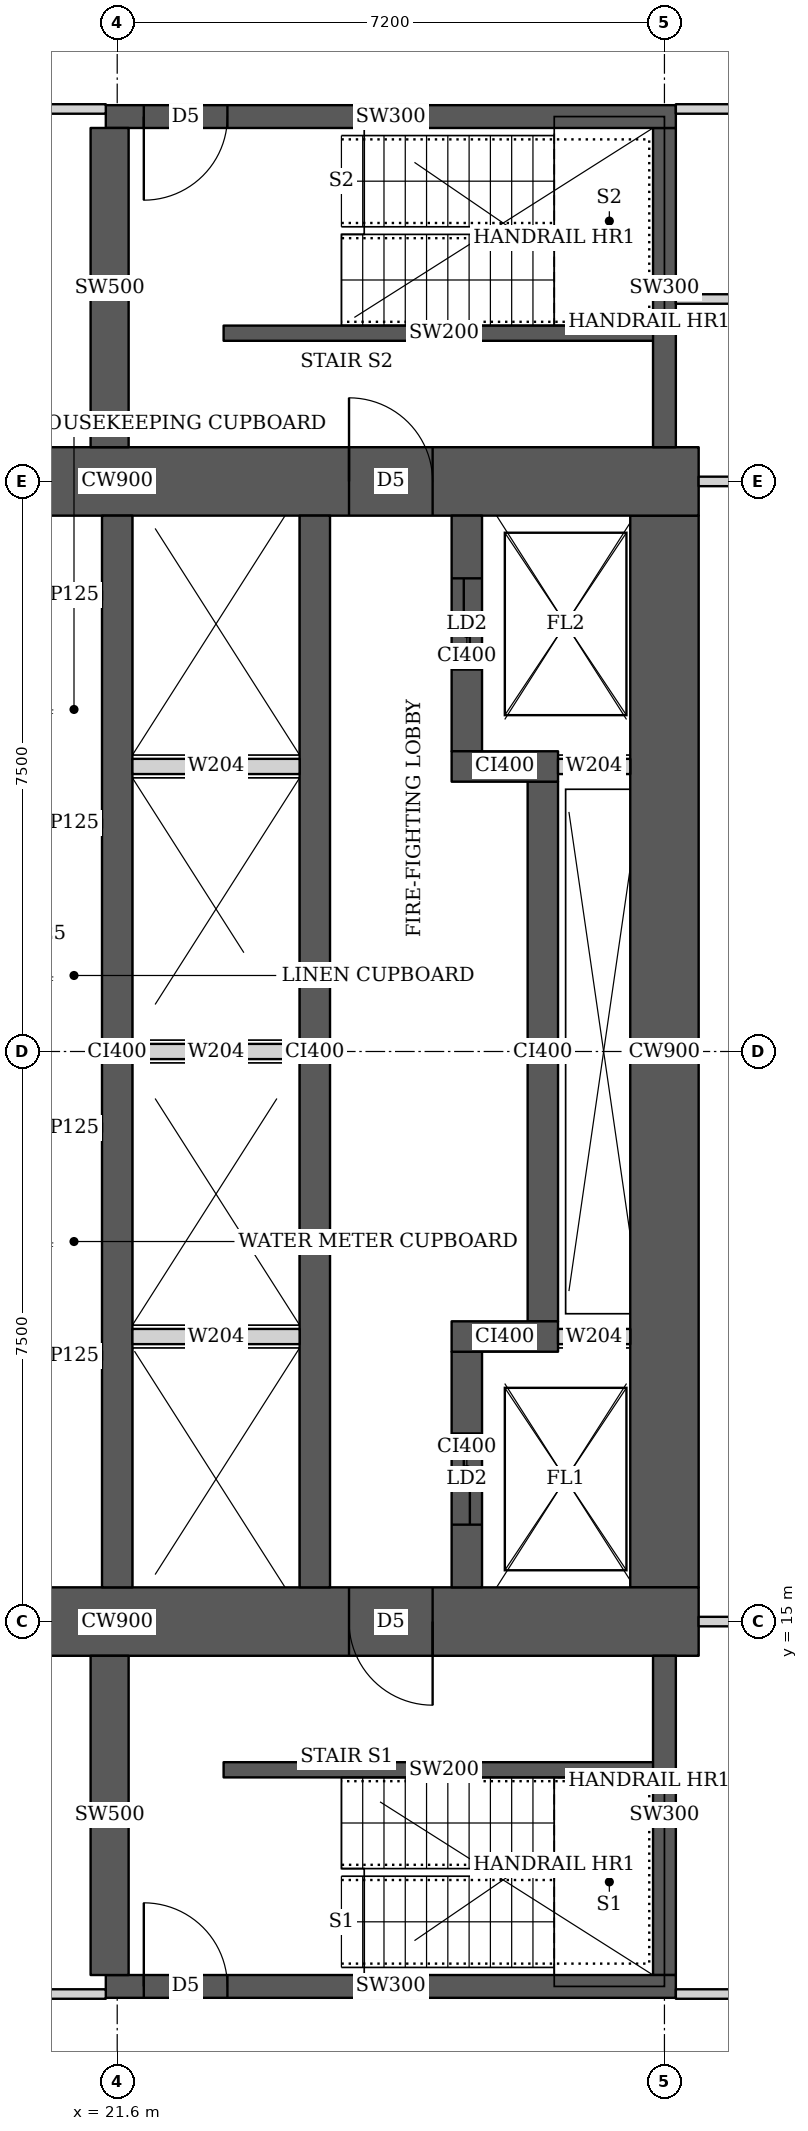
"""IFC4 building model, lengths in metres.
Left out: names, types, materials, properties, quantities, classifications, styles, units other than length and angle.
Written with IfcOpenShell. Run it as: python <this file> out.ifc"""

import sys

from ifc_helpers import new_model, si_unit, direction, frame, frame_2d, origin, place, context, subcontext, project, spatial, rectangle, extrude, element, fill, save


model = new_model("IFC4")
c1 = context("Model", 3, precision=1e-05, world=origin(), true_north=direction((0.0, 1.0)))
c2 = subcontext(c1, "Body", "Model", "MODEL_VIEW")
j1 = project(units=[si_unit("LENGTHUNIT", "METRE"), si_unit("PLANEANGLEUNIT", "RADIAN")], contexts=[c1])
p1 = place(None, origin())
s1 = spatial("IfcSite", under=j1, at=p1, CompositionType="ELEMENT")
p2 = place(p1, origin())
s2 = spatial("IfcBuilding", under=s1, at=p2, CompositionType="ELEMENT")
p3 = place(p2, frame((0.0, 0.0, 53.75)))
s3 = spatial("IfcBuildingStorey", under=s2, at=p3, CompositionType="ELEMENT", Elevation=53.75)
p4 = place(p3, frame((13.95, 15.0, 0.0), z_axis=(0.0, 0.0, 1.0), x_axis=(1.0, 0.0, 0.0)))
e1 = element("IfcWall", 1, at=p4, inside=s3, PredefinedType="SHEAR", context=c2, shape_type="SweptSolid", body=[
    extrude(rectangle(XDim=15.3, YDim=0.9, at=frame_2d((7.65, 0.0))), origin(), (0.0, 0.0, 1.0), 3.75),
])
p5 = place(p4, frame((4.45, 0.0, 0.0)))
e2 = element("IfcOpeningElement", 2, at=p5, cuts=e1, PredefinedType="OPENING", context=c2, shape_type="SweptSolid", body=[
    extrude(rectangle(XDim=1.8, YDim=2.1, at=frame_2d((0.9, 1.05))), frame((0.0, 0.46, 0.0), z_axis=(0.0, -1.0, 0.0), x_axis=(1.0, 0.0, 0.0)), (0.0, 0.0, 1.0), 0.92),
])
p6 = place(p4, frame((10.7, 0.0, 0.0)))
e3 = element("IfcOpeningElement", 3, at=p6, cuts=e1, PredefinedType="OPENING", context=c2, shape_type="SweptSolid", body=[
    extrude(rectangle(XDim=1.1, YDim=2.1, at=frame_2d((0.55, 1.05))), frame((0.0, 0.46, 0.0), z_axis=(0.0, -1.0, 0.0), x_axis=(1.0, 0.0, 0.0)), (0.0, 0.0, 1.0), 0.92),
])
p7 = place(p3, frame((13.95, 30.0, 0.0), z_axis=(0.0, 0.0, 1.0), x_axis=(1.0, 0.0, 0.0)))
e4 = element("IfcWall", 4, at=p7, inside=s3, PredefinedType="SHEAR", context=c2, shape_type="SweptSolid", body=[
    extrude(rectangle(XDim=15.3, YDim=0.9, at=frame_2d((7.65, 0.0))), origin(), (0.0, 0.0, 1.0), 3.75),
])
p8 = place(p7, frame((4.45, 0.0, 0.0)))
e5 = element("IfcOpeningElement", 5, at=p8, cuts=e4, PredefinedType="OPENING", context=c2, shape_type="SweptSolid", body=[
    extrude(rectangle(XDim=1.8, YDim=2.1, at=frame_2d((0.9, 1.05))), frame((0.0, 0.46, 0.0), z_axis=(0.0, -1.0, 0.0), x_axis=(1.0, 0.0, 0.0)), (0.0, 0.0, 1.0), 0.92),
])
p9 = place(p7, frame((10.7, 0.0, 0.0)))
e6 = element("IfcOpeningElement", 6, at=p9, cuts=e4, PredefinedType="OPENING", context=c2, shape_type="SweptSolid", body=[
    extrude(rectangle(XDim=1.1, YDim=2.1, at=frame_2d((0.55, 1.05))), frame((0.0, 0.46, 0.0), z_axis=(0.0, -1.0, 0.0), x_axis=(1.0, 0.0, 0.0)), (0.0, 0.0, 1.0), 0.92),
])
p10 = place(p3, frame((28.8, 15.45, 0.0), z_axis=(0.0, 0.0, 1.0), x_axis=(0.0, 1.0, 0.0)))
e7 = element("IfcWall", 7, at=p10, inside=s3, PredefinedType="SHEAR", context=c2, shape_type="SweptSolid", body=[
    extrude(rectangle(XDim=14.1, YDim=0.9, at=frame_2d((7.05, 0.0))), origin(), (0.0, 0.0, 1.0), 3.75),
])
for number, where, z_axis, x_axis in (
    (8, (21.6, 15.45, 0.0), (0.0, 0.0, 1.0), (0.0, 1.0, 0.0)),
    (9, (24.2, 15.45, 0.0), (0.0, 0.0, 1.0), (0.0, 1.0, 0.0)),
):
    element("IfcWall", number, at=place(p3, frame(where, z_axis=z_axis, x_axis=x_axis)), inside=s3, PredefinedType="SHEAR", context=c2, shape_type="SweptSolid", body=[
        extrude(rectangle(XDim=14.1, YDim=0.4, at=frame_2d((7.05, 0.0))), origin(), (0.0, 0.0, 1.0), 3.75),
    ])
p11 = place(p3, frame((26.2, 15.45, 0.0), z_axis=(0.0, 0.0, 1.0), x_axis=(0.0, 1.0, 0.0)))
e10 = element("IfcWall", 10, at=p11, inside=s3, PredefinedType="SHEAR", context=c2, shape_type="SweptSolid", body=[
    extrude(rectangle(XDim=3.1, YDim=0.4, at=frame_2d((1.55, 0.0))), origin(), (0.0, 0.0, 1.0), 3.75),
])
p12 = place(p11, frame((0.825, 0.0, 0.0)))
e11 = element("IfcOpeningElement", 11, at=p12, cuts=e10, PredefinedType="OPENING", context=c2, shape_type="SweptSolid", body=[
    extrude(rectangle(XDim=1.2, YDim=2.1, at=frame_2d((0.6, 1.05))), frame((0.0, 0.21, 0.0), z_axis=(0.0, -1.0, 0.0), x_axis=(1.0, 0.0, 0.0)), (0.0, 0.0, 1.0), 0.42),
])
p13 = place(p3, frame((26.0, 18.75, 0.0), z_axis=(0.0, 0.0, 1.0), x_axis=(1.0, 0.0, 0.0)))
e12 = element("IfcWall", 12, at=p13, inside=s3, PredefinedType="SHEAR", context=c2, shape_type="SweptSolid", body=[
    extrude(rectangle(XDim=1.4, YDim=0.4, at=frame_2d((0.7, 0.0))), origin(), (0.0, 0.0, 1.0), 3.75),
])
p14 = place(p3, frame((27.2, 18.95, 0.0), z_axis=(0.0, 0.0, 1.0), x_axis=(0.0, 1.0, 0.0)))
e13 = element("IfcWall", 13, at=p14, inside=s3, PredefinedType="SHEAR", context=c2, shape_type="SweptSolid", body=[
    extrude(rectangle(XDim=7.1, YDim=0.4, at=frame_2d((3.55, 0.0))), origin(), (0.0, 0.0, 1.0), 3.75),
])
p15 = place(p3, frame((26.0, 26.25, 0.0), z_axis=(0.0, 0.0, 1.0), x_axis=(1.0, 0.0, 0.0)))
e14 = element("IfcWall", 14, at=p15, inside=s3, PredefinedType="SHEAR", context=c2, shape_type="SweptSolid", body=[
    extrude(rectangle(XDim=1.4, YDim=0.4, at=frame_2d((0.7, 0.0))), origin(), (0.0, 0.0, 1.0), 3.75),
])
p16 = place(p3, frame((26.2, 26.45, 0.0), z_axis=(0.0, 0.0, 1.0), x_axis=(0.0, 1.0, 0.0)))
e15 = element("IfcWall", 15, at=p16, inside=s3, PredefinedType="SHEAR", context=c2, shape_type="SweptSolid", body=[
    extrude(rectangle(XDim=3.1, YDim=0.4, at=frame_2d((1.55, 0.0))), origin(), (0.0, 0.0, 1.0), 3.75),
])
p17 = place(p16, frame((1.075, 0.0, 0.0)))
e16 = element("IfcOpeningElement", 16, at=p17, cuts=e15, PredefinedType="OPENING", context=c2, shape_type="SweptSolid", body=[
    extrude(rectangle(XDim=1.2, YDim=2.1, at=frame_2d((0.6, 1.05))), frame((0.0, 0.21, 0.0), z_axis=(0.0, -1.0, 0.0), x_axis=(1.0, 0.0, 0.0)), (0.0, 0.0, 1.0), 0.42),
])
p18 = place(p3, frame((21.45, 10.2, 0.0), z_axis=(0.0, 0.0, 1.0), x_axis=(1.0, 0.0, 0.0)))
e17 = element("IfcWall", 17, at=p18, inside=s3, PredefinedType="SHEAR", context=c2, shape_type="SweptSolid", body=[
    extrude(rectangle(XDim=7.5, YDim=0.3, at=frame_2d((3.75, 0.0))), origin(), (0.0, 0.0, 1.0), 3.75),
])
p19 = place(p18, frame((0.5, 0.0, 0.0)))
e18 = element("IfcOpeningElement", 18, at=p19, cuts=e17, PredefinedType="OPENING", context=c2, shape_type="SweptSolid", body=[
    extrude(rectangle(XDim=1.1, YDim=2.1, at=frame_2d((0.55, 1.05))), frame((0.0, 0.16, 0.0), z_axis=(0.0, -1.0, 0.0), x_axis=(1.0, 0.0, 0.0)), (0.0, 0.0, 1.0), 0.32),
])
p20 = place(p3, frame((21.5, 10.35, 0.0), z_axis=(0.0, 0.0, 1.0), x_axis=(0.0, 1.0, 0.0)))
e19 = element("IfcWall", 19, at=p20, inside=s3, PredefinedType="SHEAR", context=c2, shape_type="SweptSolid", body=[
    extrude(rectangle(XDim=4.2, YDim=0.5, at=frame_2d((2.1, 0.0))), origin(), (0.0, 0.0, 1.0), 3.75),
])
p21 = place(p3, frame((28.8, 10.35, 0.0), z_axis=(0.0, 0.0, 1.0), x_axis=(0.0, 1.0, 0.0)))
e20 = element("IfcWall", 20, at=p21, inside=s3, PredefinedType="SHEAR", context=c2, shape_type="SweptSolid", body=[
    extrude(rectangle(XDim=4.2, YDim=0.3, at=frame_2d((2.1, 0.0))), origin(), (0.0, 0.0, 1.0), 3.75),
])
p22 = place(p3, frame((21.45, 34.8, 0.0), z_axis=(0.0, 0.0, 1.0), x_axis=(1.0, 0.0, 0.0)))
e21 = element("IfcWall", 21, at=p22, inside=s3, PredefinedType="SHEAR", context=c2, shape_type="SweptSolid", body=[
    extrude(rectangle(XDim=7.5, YDim=0.3, at=frame_2d((3.75, 0.0))), origin(), (0.0, 0.0, 1.0), 3.75),
])
p23 = place(p22, frame((0.5, 0.0, 0.0)))
e22 = element("IfcOpeningElement", 22, at=p23, cuts=e21, PredefinedType="OPENING", context=c2, shape_type="SweptSolid", body=[
    extrude(rectangle(XDim=1.1, YDim=2.1, at=frame_2d((0.55, 1.05))), frame((0.0, 0.16, 0.0), z_axis=(0.0, -1.0, 0.0), x_axis=(1.0, 0.0, 0.0)), (0.0, 0.0, 1.0), 0.32),
])
p24 = place(p3, frame((21.5, 30.45, 0.0), z_axis=(0.0, 0.0, 1.0), x_axis=(0.0, 1.0, 0.0)))
e23 = element("IfcWall", 23, at=p24, inside=s3, PredefinedType="SHEAR", context=c2, shape_type="SweptSolid", body=[
    extrude(rectangle(XDim=4.2, YDim=0.5, at=frame_2d((2.1, 0.0))), origin(), (0.0, 0.0, 1.0), 3.75),
])
p25 = place(p3, frame((28.8, 30.45, 0.0), z_axis=(0.0, 0.0, 1.0), x_axis=(0.0, 1.0, 0.0)))
e24 = element("IfcWall", 24, at=p25, inside=s3, PredefinedType="SHEAR", context=c2, shape_type="SweptSolid", body=[
    extrude(rectangle(XDim=4.2, YDim=0.3, at=frame_2d((2.1, 0.0))), origin(), (0.0, 0.0, 1.0), 3.75),
])
p26 = place(p3, frame((10.163, 10.1, 0.0), z_axis=(0.0, 0.0, 1.0), x_axis=(1.0, 0.0, 0.0)))
e25 = element("IfcWall", 25, at=p26, inside=s3, PredefinedType="PARTITIONING", context=c2, shape_type="SweptSolid", body=[
    extrude(rectangle(XDim=11.287, YDim=0.125, at=frame_2d((5.644, 0.0))), origin(), (0.0, 0.0, 1.0), 3.5),
])
p27 = place(p26, frame((7.832, 0.0, 0.0)))
e26 = element("IfcOpeningElement", 26, at=p27, cuts=e25, PredefinedType="OPENING", context=c2, shape_type="SweptSolid", body=[
    extrude(rectangle(XDim=1.8, YDim=2.1, at=frame_2d((0.9, 1.05))), frame((0.0, 0.073, 0.0), z_axis=(0.0, -1.0, 0.0), x_axis=(1.0, 0.0, 0.0)), (0.0, 0.0, 1.0), 0.145),
])
p28 = place(p3, frame((10.163, 34.9, 0.0), z_axis=(0.0, 0.0, 1.0), x_axis=(1.0, 0.0, 0.0)))
e27 = element("IfcWall", 27, at=p28, inside=s3, PredefinedType="PARTITIONING", context=c2, shape_type="SweptSolid", body=[
    extrude(rectangle(XDim=11.287, YDim=0.125, at=frame_2d((5.644, 0.0))), origin(), (0.0, 0.0, 1.0), 3.5),
])
p29 = place(p28, frame((7.737, 0.0, 0.0)))
e28 = element("IfcOpeningElement", 28, at=p29, cuts=e27, PredefinedType="OPENING", context=c2, shape_type="SweptSolid", body=[
    extrude(rectangle(XDim=1.8, YDim=2.1, at=frame_2d((0.9, 1.05))), frame((0.0, 0.073, 0.0), z_axis=(0.0, -1.0, 0.0), x_axis=(1.0, 0.0, 0.0)), (0.0, 0.0, 1.0), 0.145),
])
p30 = place(p3, frame((28.95, 10.1, 0.0), z_axis=(0.0, 0.0, 1.0), x_axis=(1.0, 0.0, 0.0)))
e29 = element("IfcWall", 29, at=p30, inside=s3, PredefinedType="PARTITIONING", context=c2, shape_type="SweptSolid", body=[
    extrude(rectangle(XDim=9.188, YDim=0.125, at=frame_2d((4.594, 0.0))), origin(), (0.0, 0.0, 1.0), 3.5),
])
p31 = place(p3, frame((28.95, 34.9, 0.0), z_axis=(0.0, 0.0, 1.0), x_axis=(1.0, 0.0, 0.0)))
e30 = element("IfcWall", 30, at=p31, inside=s3, PredefinedType="PARTITIONING", context=c2, shape_type="SweptSolid", body=[
    extrude(rectangle(XDim=4.588, YDim=0.125, at=frame_2d((2.294, 0.0))), origin(), (0.0, 0.0, 1.0), 3.5),
])
p32 = place(p3, frame((29.25, 15.0, 0.0), z_axis=(0.0, 0.0, 1.0), x_axis=(1.0, 0.0, 0.0)))
e31 = element("IfcWall", 31, at=p32, inside=s3, PredefinedType="PARTITIONING", context=c2, shape_type="SweptSolid", body=[
    extrude(rectangle(XDim=5.849, YDim=0.125, at=frame_2d((2.925, 0.0))), origin(), (0.0, 0.0, 1.0), 3.5),
])
p33 = place(p3, frame((29.25, 30.0, 0.0), z_axis=(0.0, 0.0, 1.0), x_axis=(1.0, 0.0, 0.0)))
e32 = element("IfcWall", 32, at=p33, inside=s3, PredefinedType="PARTITIONING", context=c2, shape_type="SweptSolid", body=[
    extrude(rectangle(XDim=2.849, YDim=0.125, at=frame_2d((1.425, 0.0))), origin(), (0.0, 0.0, 1.0), 3.5),
])
p34 = place(p3, frame((28.95, 32.4, 0.0), z_axis=(0.0, 0.0, 1.0), x_axis=(1.0, 0.0, 0.0)))
e33 = element("IfcWall", 33, at=p34, inside=s3, PredefinedType="PARTITIONING", context=c2, shape_type="SweptSolid", body=[
    extrude(rectangle(XDim=4.976, YDim=0.125, at=frame_2d((2.488, 0.0))), origin(), (0.0, 0.0, 1.0), 3.5),
])
for number, where, z_axis, x_axis in (
    (34, (20.663, 18.5, 0.0), (0.0, 0.0, 1.0), (1.0, 0.0, 0.0)),
    (35, (20.663, 28.5, 0.0), (0.0, 0.0, 1.0), (1.0, 0.0, 0.0)),
    (36, (20.663, 21.5, 0.0), (0.0, 0.0, 1.0), (1.0, 0.0, 0.0)),
    (37, (20.663, 25.5, 0.0), (0.0, 0.0, 1.0), (1.0, 0.0, 0.0)),
):
    element("IfcWall", number, at=place(p3, frame(where, z_axis=z_axis, x_axis=x_axis)), inside=s3, PredefinedType="PARTITIONING", context=c2, shape_type="SweptSolid", body=[
        extrude(rectangle(XDim=0.737, YDim=0.125, at=frame_2d((0.368, 0.0))), origin(), (0.0, 0.0, 1.0), 3.5),
    ])
for number, where, z_axis, x_axis in (
    (38, (23.0, 13.05, 0.0), (0.0, 0.0, 1.0), (1.0, 0.0, 0.0)),
    (39, (23.0, 31.95, 0.0), (0.0, 0.0, 1.0), (1.0, 0.0, 0.0)),
):
    element("IfcWall", number, at=place(p3, frame(where, z_axis=z_axis, x_axis=x_axis)), inside=s3, PredefinedType="SHEAR", context=c2, shape_type="SweptSolid", body=[
        extrude(rectangle(XDim=5.8, YDim=0.2, at=frame_2d((2.9, 0.0))), origin(), (0.0, 0.0, 1.0), 3.75),
    ])
for number, where, z_axis, x_axis in (
    (40, (21.8, 18.75, 0.0), (0.0, 0.0, 1.0), (1.0, 0.0, 0.0)),
    (41, (21.8, 22.5, 0.0), (0.0, 0.0, 1.0), (1.0, 0.0, 0.0)),
    (42, (21.8, 26.25, 0.0), (0.0, 0.0, 1.0), (1.0, 0.0, 0.0)),
):
    element("IfcWall", number, at=place(p3, frame(where, z_axis=z_axis, x_axis=x_axis)), inside=s3, PredefinedType="SOLIDWALL", context=c2, shape_type="SweptSolid", body=[
        extrude(rectangle(XDim=2.2, YDim=0.2, at=frame_2d((1.1, 0.0))), origin(), (0.0, 0.0, 1.0), 3.5),
    ])
for number, where, z_axis, x_axis in (
    (43, (27.4, 18.75, 0.0), (0.0, 0.0, 1.0), (1.0, 0.0, 0.0)),
    (44, (27.4, 26.25, 0.0), (0.0, 0.0, 1.0), (1.0, 0.0, 0.0)),
):
    element("IfcWall", number, at=place(p3, frame(where, z_axis=z_axis, x_axis=x_axis)), inside=s3, PredefinedType="SOLIDWALL", context=c2, shape_type="SweptSolid", body=[
        extrude(rectangle(XDim=0.95, YDim=0.2, at=frame_2d((0.475, 0.0))), origin(), (0.0, 0.0, 1.0), 3.5),
    ])
p35 = place(p6, origin())
e45 = element("IfcDoor", 45, at=p35, inside=s3, OperationType="SINGLE_SWING_LEFT", PredefinedType="DOOR", context=c2, shape_type="SweptSolid", body=[
    extrude(rectangle(XDim=1.1, YDim=2.1, at=frame_2d((0.55, 1.05))), frame((0.0, 0.025, 0.0), z_axis=(0.0, -1.0, 0.0), x_axis=(1.0, 0.0, 0.0)), (0.0, 0.0, 1.0), 0.05),
])
fill(e3, e45)
p36 = place(p9, origin())
e46 = element("IfcDoor", 46, at=p36, inside=s3, OperationType="SINGLE_SWING_LEFT", PredefinedType="DOOR", context=c2, shape_type="SweptSolid", body=[
    extrude(rectangle(XDim=1.1, YDim=2.1, at=frame_2d((0.55, 1.05))), frame((0.0, 0.025, 0.0), z_axis=(0.0, -1.0, 0.0), x_axis=(1.0, 0.0, 0.0)), (0.0, 0.0, 1.0), 0.05),
])
fill(e6, e46)
p37 = place(p12, origin())
e47 = element("IfcDoor", 47, at=p37, inside=s3, OperationType="DOUBLE_DOOR_SLIDING", PredefinedType="DOOR", context=c2, shape_type="SweptSolid", body=[
    extrude(rectangle(XDim=1.2, YDim=2.1, at=frame_2d((0.6, 1.05))), frame((0.0, 0.025, 0.0), z_axis=(0.0, -1.0, 0.0), x_axis=(1.0, 0.0, 0.0)), (0.0, 0.0, 1.0), 0.05),
])
fill(e11, e47)
p38 = place(p17, origin())
e48 = element("IfcDoor", 48, at=p38, inside=s3, OperationType="DOUBLE_DOOR_SLIDING", PredefinedType="DOOR", context=c2, shape_type="SweptSolid", body=[
    extrude(rectangle(XDim=1.2, YDim=2.1, at=frame_2d((0.6, 1.05))), frame((0.0, 0.025, 0.0), z_axis=(0.0, -1.0, 0.0), x_axis=(1.0, 0.0, 0.0)), (0.0, 0.0, 1.0), 0.05),
])
fill(e16, e48)
p39 = place(p19, origin())
e49 = element("IfcDoor", 49, at=p39, inside=s3, OperationType="SINGLE_SWING_LEFT", PredefinedType="DOOR", context=c2, shape_type="SweptSolid", body=[
    extrude(rectangle(XDim=1.1, YDim=2.1, at=frame_2d((0.55, 1.05))), frame((0.0, 0.025, 0.0), z_axis=(0.0, -1.0, 0.0), x_axis=(1.0, 0.0, 0.0)), (0.0, 0.0, 1.0), 0.05),
])
fill(e18, e49)
p40 = place(p23, origin())
e50 = element("IfcDoor", 50, at=p40, inside=s3, OperationType="SINGLE_SWING_RIGHT", PredefinedType="DOOR", context=c2, shape_type="SweptSolid", body=[
    extrude(rectangle(XDim=1.1, YDim=2.1, at=frame_2d((0.55, 1.05))), frame((0.0, 0.025, 0.0), z_axis=(0.0, -1.0, 0.0), x_axis=(1.0, 0.0, 0.0)), (0.0, 0.0, 1.0), 0.05),
])
fill(e22, e50)
save(model, sys.argv[1])
